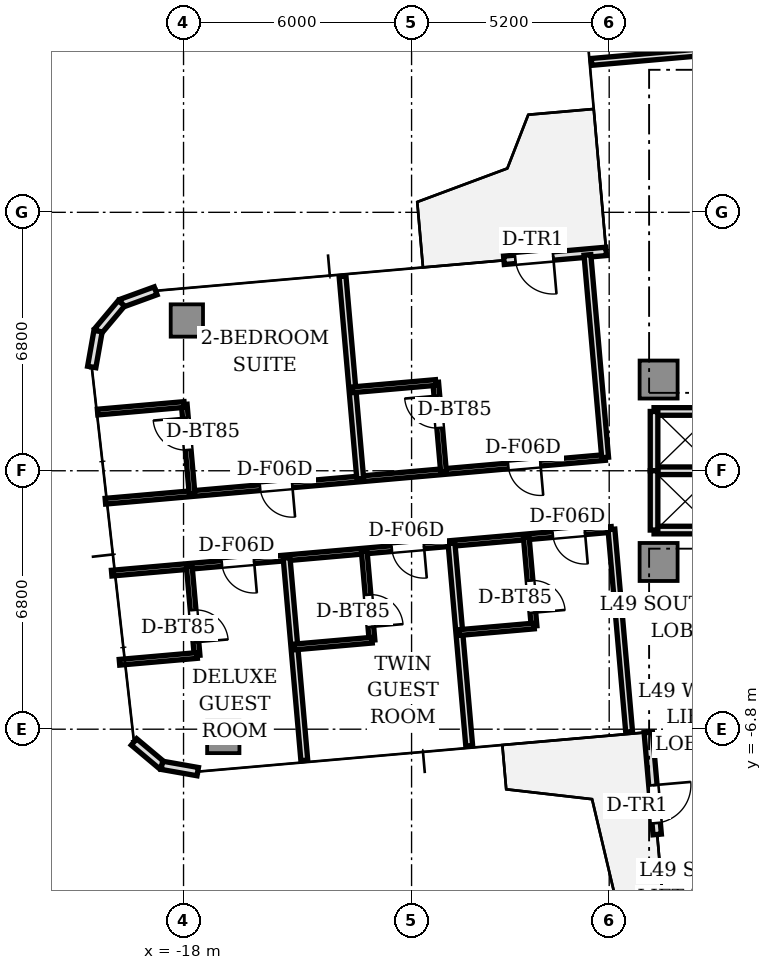
"""IFC4 building model, lengths in metres.
Left out: names, types, materials, properties, quantities, classifications, styles, units other than length and angle.
Written with IfcOpenShell. Run it as: python <this file> out.ifc"""

import sys

from ifc_helpers import new_model, si_unit, direction, frame, frame_2d, origin, origin_2d, place, context, subcontext, project, spatial, rectangle, extrude, source, transform, mapped, element, fill, save


model = new_model("IFC4")
c1 = context("Model", 3, precision=1e-05, world=origin(), true_north=direction((0.0, 1.0)))
c2 = subcontext(c1, "Body", "Model", "MODEL_VIEW")
j1 = project(units=[si_unit("LENGTHUNIT", "METRE"), si_unit("PLANEANGLEUNIT", "RADIAN")], contexts=[c1])
p1 = place(None, origin())
s1 = spatial("IfcSite", under=j1, at=p1, CompositionType="ELEMENT")
p2 = place(p1, origin())
s2 = spatial("IfcBuilding", under=s1, at=p2, CompositionType="ELEMENT")
p3 = place(p2, frame((0.0, 0.0, 178.55)))
s3 = spatial("IfcBuildingStorey", under=s2, at=p3, CompositionType="ELEMENT", Elevation=178.55)
m1 = source(origin(), c2, "Body", "SweptSolid", [
    extrude(rectangle(XDim=1.0, YDim=1.0, at=origin_2d()), origin(), (0.0, 0.0, 1.0), 3.11),
])
for number, where, z_axis, x_axis in (
    (1, (-5.5, 2.4, 0.0), (0.0, 0.0, 1.0), (1.0, 0.0, 0.0)),
    (2, (-5.5, -2.4, 0.0), (0.0, 0.0, 1.0), (1.0, 0.0, 0.0)),
):
    element("IfcColumn", number, at=place(p3, frame(where, z_axis=z_axis, x_axis=x_axis)), inside=s3, PredefinedType="COLUMN", context=c2, shape_type="MappedRepresentation", body=[
        mapped(m1, transform((0.0, 0.0, 0.0), scale=1.0)),
    ])
m2 = source(origin(), c2, "Body", "SweptSolid", [
    extrude(rectangle(XDim=0.85, YDim=0.85, at=origin_2d()), origin(), (0.0, 0.0, 1.0), 3.11),
])
for number, where, z_axis, x_axis in (
    (3, (-17.913, 3.954, 0.0), (0.0, 0.0, 1.0), (1.0, 0.0, 0.0)),
    (4, (-16.954, -7.004, 0.0), (0.0, 0.0, 1.0), (1.0, 0.0, 0.0)),
):
    element("IfcColumn", number, at=place(p3, frame(where, z_axis=z_axis, x_axis=x_axis)), inside=s3, PredefinedType="COLUMN", context=c2, shape_type="MappedRepresentation", body=[
        mapped(m2, transform((0.0, 0.0, 0.0), scale=1.0)),
    ])
p4 = place(p3, frame((-6.879, 5.772, 0.0), z_axis=(0.0, 0.0, 1.0), x_axis=(-0.996193619346, -0.087168071984, 0.0)))
e5 = element("IfcWall", 5, at=p4, inside=s3, PredefinedType="STANDARD", context=c2, shape_type="SweptSolid", body=[
    extrude(rectangle(XDim=2.7, YDim=0.22, at=frame_2d((1.35, 0.0))), origin(), (0.0, 0.0, 1.0), 3.11),
])
p5 = place(p4, frame((1.4, 0.0, 0.0)))
e6 = element("IfcOpeningElement", 6, at=p5, cuts=e5, PredefinedType="OPENING", context=c2, shape_type="SweptSolid", body=[
    extrude(rectangle(XDim=1.0, YDim=2.2, at=frame_2d((0.5, 1.1))), frame((0.0, 0.12, 0.0), z_axis=(0.0, -1.0, 0.0), x_axis=(1.0, 0.0, 0.0)), (0.0, 0.0, 1.0), 0.24),
])
p6 = place(p3, frame((-18.734, 4.735, 0.0), z_axis=(0.0, 0.0, 1.0), x_axis=(-0.939741306239, -0.34188635151, 0.0)))
e7 = element("IfcWall", 7, at=p6, inside=s3, PredefinedType="STANDARD", context=c2, shape_type="SweptSolid", body=[
    extrude(rectangle(XDim=0.958, YDim=0.22, at=frame_2d((0.479, 0.0))), origin(), (0.0, 0.0, 1.0), 3.11),
])
for number, where, z_axis, x_axis in (
    (8, (-19.634, 4.408, 0.0), (0.0, 0.0, 1.0), (-0.643, -0.766, 0.0)),
    (9, (-20.25, 3.674, 0.0), (0.0, 0.0, 1.0), (-0.174, -0.985, 0.0)),
):
    element("IfcWall", number, at=place(p3, frame(where, z_axis=z_axis, x_axis=x_axis)), inside=s3, PredefinedType="STANDARD", context=c2, shape_type="SweptSolid", body=[
        extrude(rectangle(XDim=0.958, YDim=0.22, at=frame_2d((0.479, 0.0))), origin(), (0.0, 0.0, 1.0), 3.11),
    ])
p7 = place(p3, frame((-19.304, -7.135, 0.0), z_axis=(0.0, 0.0, 1.0), x_axis=(0.766001159887, -0.642839189107, 0.0)))
e10 = element("IfcWall", 10, at=p7, inside=s3, PredefinedType="STANDARD", context=c2, shape_type="SweptSolid", body=[
    extrude(rectangle(XDim=0.958, YDim=0.22, at=frame_2d((0.479, 0.0))), origin(), (0.0, 0.0, 1.0), 3.11),
])
p8 = place(p3, frame((-18.57, -7.75, 0.0), z_axis=(0.0, 0.0, 1.0), x_axis=(0.984770724397, -0.173858046606, 0.0)))
e11 = element("IfcWall", 11, at=p8, inside=s3, PredefinedType="STANDARD", context=c2, shape_type="SweptSolid", body=[
    extrude(rectangle(XDim=0.958, YDim=0.22, at=frame_2d((0.479, 0.0))), origin(), (0.0, 0.0, 1.0), 3.11),
])
p9 = place(p3, frame((-5.772, -6.879, 0.0), z_axis=(0.0, 0.0, 1.0), x_axis=(0.087168071984, -0.996193619346, 0.0)))
e12 = element("IfcWall", 12, at=p9, inside=s3, PredefinedType="STANDARD", context=c2, shape_type="SweptSolid", body=[
    extrude(rectangle(XDim=2.7, YDim=0.22, at=frame_2d((1.35, 0.0))), origin(), (0.0, 0.0, 1.0), 3.11),
])
p10 = place(p9, frame((1.4, 0.0, 0.0)))
e13 = element("IfcOpeningElement", 13, at=p10, cuts=e12, PredefinedType="OPENING", context=c2, shape_type="SweptSolid", body=[
    extrude(rectangle(XDim=1.0, YDim=2.2, at=frame_2d((0.5, 1.1))), frame((0.0, 0.12, 0.0), z_axis=(0.0, -1.0, 0.0), x_axis=(1.0, 0.0, 0.0)), (0.0, 0.0, 1.0), 0.24),
])
for number, where, z_axis, x_axis in (
    (14, (-5.62, 1.56, 0.0), (0.0, 0.0, 1.0), (1.0, 0.0, 0.0)),
    (15, (-5.62, -1.56, 0.0), (0.0, 0.0, 1.0), (1.0, 0.0, 0.0)),
    (16, (-5.62, 0.0, 0.0), (0.0, 0.0, 1.0), (1.0, 0.0, 0.0)),
):
    element("IfcWall", number, at=place(p3, frame(where, z_axis=z_axis, x_axis=x_axis)), inside=s3, PredefinedType="SOLIDWALL", context=c2, shape_type="SweptSolid", body=[
        extrude(rectangle(XDim=1.64, YDim=0.2, at=frame_2d((0.82, 0.0))), origin(), (0.0, 0.0, 1.0), 2.66),
    ])
for number, where, z_axis, x_axis in (
    (17, (-5.62, 0.0, 0.0), (0.0, 0.0, 1.0), (0.0, 1.0, 0.0)),
    (18, (-5.62, -1.56, 0.0), (0.0, 0.0, 1.0), (0.0, 1.0, 0.0)),
):
    element("IfcWall", number, at=place(p3, frame(where, z_axis=z_axis, x_axis=x_axis)), inside=s3, PredefinedType="SOLIDWALL", context=c2, shape_type="SweptSolid", body=[
        extrude(rectangle(XDim=1.56, YDim=0.2, at=frame_2d((0.78, 0.0))), origin(), (0.0, 0.0, 1.0), 2.66),
    ])
p11 = place(p3, frame((-1.936, 11.224, 0.0), z_axis=(0.0, 0.0, 1.0), x_axis=(-0.996194212812, -0.087161289348, 0.0)))
e19 = element("IfcWall", 19, at=p11, inside=s3, PredefinedType="PARTITIONING", context=c2, shape_type="SweptSolid", body=[
    extrude(rectangle(XDim=5.35, YDim=0.18, at=frame_2d((2.675, 0.0))), origin(), (0.0, 0.0, 1.0), 2.66),
])
p12 = place(p3, frame((-6.741, -1.543, 0.0), z_axis=(0.0, 0.0, 1.0), x_axis=(-0.996195062465, -0.087151577845, 0.0)))
e20 = element("IfcWall", 20, at=p12, inside=s3, PredefinedType="PARTITIONING", context=c2, shape_type="SweptSolid", body=[
    extrude(rectangle(XDim=13.2, YDim=0.15, at=frame_2d((6.6, 0.0))), origin(), (0.0, 0.0, 1.0), 2.66),
])
p13 = place(p12, frame((0.7, 0.0, 0.0)))
e21 = element("IfcOpeningElement", 21, at=p13, cuts=e20, PredefinedType="OPENING", context=c2, shape_type="SweptSolid", body=[
    extrude(rectangle(XDim=0.85, YDim=2.1, at=frame_2d((0.425, 1.05))), frame((0.0, 0.085, 0.0), z_axis=(0.0, -1.0, 0.0), x_axis=(1.0, 0.0, 0.0)), (0.0, 0.0, 1.0), 0.17),
])
p14 = place(p12, frame((4.952, 0.0, 0.0)))
e22 = element("IfcOpeningElement", 22, at=p14, cuts=e20, PredefinedType="OPENING", context=c2, shape_type="SweptSolid", body=[
    extrude(rectangle(XDim=0.85, YDim=2.1, at=frame_2d((0.425, 1.05))), frame((0.0, 0.085, 0.0), z_axis=(0.0, -1.0, 0.0), x_axis=(1.0, 0.0, 0.0)), (0.0, 0.0, 1.0), 0.17),
])
p15 = place(p12, frame((9.44, 0.0, 0.0)))
e23 = element("IfcOpeningElement", 23, at=p15, cuts=e20, PredefinedType="OPENING", context=c2, shape_type="SweptSolid", body=[
    extrude(rectangle(XDim=0.85, YDim=2.1, at=frame_2d((0.425, 1.05))), frame((0.0, 0.085, 0.0), z_axis=(0.0, -1.0, 0.0), x_axis=(1.0, 0.0, 0.0)), (0.0, 0.0, 1.0), 0.17),
])
p16 = place(p3, frame((-6.907, 0.349, 0.0), z_axis=(0.0, 0.0, 1.0), x_axis=(-0.996195062465, -0.087151577845, 0.0)))
e24 = element("IfcWall", 24, at=p16, inside=s3, PredefinedType="PARTITIONING", context=c2, shape_type="SweptSolid", body=[
    extrude(rectangle(XDim=13.2, YDim=0.15, at=frame_2d((6.6, 0.0))), origin(), (0.0, 0.0, 1.0), 2.66),
])
p17 = place(p16, frame((1.71, 0.0, 0.0)))
e25 = element("IfcOpeningElement", 25, at=p17, cuts=e24, PredefinedType="OPENING", context=c2, shape_type="SweptSolid", body=[
    extrude(rectangle(XDim=0.85, YDim=2.1, at=frame_2d((0.425, 1.05))), frame((0.0, 0.085, 0.0), z_axis=(0.0, -1.0, 0.0), x_axis=(1.0, 0.0, 0.0)), (0.0, 0.0, 1.0), 0.17),
])
p18 = place(p16, frame((8.264, 0.0, 0.0)))
e26 = element("IfcOpeningElement", 26, at=p18, cuts=e24, PredefinedType="OPENING", context=c2, shape_type="SweptSolid", body=[
    extrude(rectangle(XDim=0.85, YDim=2.1, at=frame_2d((0.425, 1.05))), frame((0.0, 0.085, 0.0), z_axis=(0.0, -1.0, 0.0), x_axis=(1.0, 0.0, 0.0)), (0.0, 0.0, 1.0), 0.17),
])
for number, where, z_axis, x_axis in (
    (27, (-6.741, -1.543, 0.0), (0.0, 0.0, 1.0), (0.087, -0.996, 0.0)),
    (28, (-7.373, 5.679, 0.0), (0.0, 0.0, 1.0), (0.087, -0.996, 0.0)),
    (29, (-10.949, -1.912, 0.0), (0.0, 0.0, 1.0), (0.087, -0.996, 0.0)),
):
    element("IfcWall", number, at=place(p3, frame(where, z_axis=z_axis, x_axis=x_axis)), inside=s3, PredefinedType="PARTITIONING", context=c2, shape_type="SweptSolid", body=[
        extrude(rectangle(XDim=5.35, YDim=0.18, at=frame_2d((2.675, 0.0))), origin(), (0.0, 0.0, 1.0), 2.66),
    ])
p19 = place(p3, frame((-8.983, -1.74, 0.0), z_axis=(0.0, 0.0, 1.0), x_axis=(0.087224846905, -0.996188649846, 0.0)))
e30 = element("IfcWall", 30, at=p19, inside=s3, PredefinedType="PARTITIONING", context=c2, shape_type="SweptSolid", body=[
    extrude(rectangle(XDim=2.354, YDim=0.15, at=frame_2d((1.177, 0.0))), origin(), (0.0, 0.0, 1.0), 2.66),
])
p20 = place(p19, frame((1.154, 0.0, 0.0)))
e31 = element("IfcOpeningElement", 31, at=p20, cuts=e30, PredefinedType="OPENING", context=c2, shape_type="SweptSolid", body=[
    extrude(rectangle(XDim=0.85, YDim=2.1, at=frame_2d((0.425, 1.05))), frame((0.0, 0.085, 0.0), z_axis=(0.0, -1.0, 0.0), x_axis=(1.0, 0.0, 0.0)), (0.0, 0.0, 1.0), 0.17),
])
p21 = place(p3, frame((-8.777, -4.084, 0.0), z_axis=(0.0, 0.0, 1.0), x_axis=(-0.996191703625, -0.087189962887, 0.0)))
e32 = element("IfcWall", 32, at=p21, inside=s3, PredefinedType="PARTITIONING", context=c2, shape_type="SweptSolid", body=[
    extrude(rectangle(XDim=1.974, YDim=0.15, at=frame_2d((0.987, 0.0))), origin(), (0.0, 0.0, 1.0), 2.66),
])
p22 = place(p3, frame((-15.289, -2.291, 0.0), z_axis=(0.0, 0.0, 1.0), x_axis=(0.087161289348, -0.996194212812, 0.0)))
e33 = element("IfcWall", 33, at=p22, inside=s3, PredefinedType="PARTITIONING", context=c2, shape_type="SweptSolid", body=[
    extrude(rectangle(XDim=5.35, YDim=0.18, at=frame_2d((2.675, 0.0))), origin(), (0.0, 0.0, 1.0), 2.66),
])
p23 = place(p3, frame((-13.246, -2.113, 0.0), z_axis=(0.0, 0.0, 1.0), x_axis=(0.087224846905, -0.996188649846, 0.0)))
e34 = element("IfcWall", 34, at=p23, inside=s3, PredefinedType="PARTITIONING", context=c2, shape_type="SweptSolid", body=[
    extrude(rectangle(XDim=2.354, YDim=0.15, at=frame_2d((1.177, 0.0))), origin(), (0.0, 0.0, 1.0), 2.66),
])
p24 = place(p23, frame((1.154, 0.0, 0.0)))
e35 = element("IfcOpeningElement", 35, at=p24, cuts=e34, PredefinedType="OPENING", context=c2, shape_type="SweptSolid", body=[
    extrude(rectangle(XDim=0.85, YDim=2.1, at=frame_2d((0.425, 1.05))), frame((0.0, 0.085, 0.0), z_axis=(0.0, -1.0, 0.0), x_axis=(1.0, 0.0, 0.0)), (0.0, 0.0, 1.0), 0.17),
])
p25 = place(p3, frame((-13.041, -4.458, 0.0), z_axis=(0.0, 0.0, 1.0), x_axis=(-0.99619307114, -0.087174336889, 0.0)))
e36 = element("IfcWall", 36, at=p25, inside=s3, PredefinedType="PARTITIONING", context=c2, shape_type="SweptSolid", body=[
    extrude(rectangle(XDim=2.05, YDim=0.15, at=frame_2d((1.025, 0.0))), origin(), (0.0, 0.0, 1.0), 2.66),
])
p26 = place(p3, frame((-17.849, -2.515, 0.0), z_axis=(0.0, 0.0, 1.0), x_axis=(0.087121918963, -0.996197656711, 0.0)))
e37 = element("IfcWall", 37, at=p26, inside=s3, PredefinedType="PARTITIONING", context=c2, shape_type="SweptSolid", body=[
    extrude(rectangle(XDim=2.354, YDim=0.15, at=frame_2d((1.177, 0.0))), origin(), (0.0, 0.0, 1.0), 2.66),
])
p27 = place(p26, frame((1.154, 0.0, 0.0)))
e38 = element("IfcOpeningElement", 38, at=p27, cuts=e37, PredefinedType="OPENING", context=c2, shape_type="SweptSolid", body=[
    extrude(rectangle(XDim=0.85, YDim=2.1, at=frame_2d((0.425, 1.05))), frame((0.0, 0.085, 0.0), z_axis=(0.0, -1.0, 0.0), x_axis=(1.0, 0.0, 0.0)), (0.0, 0.0, 1.0), 0.17),
])
p28 = place(p3, frame((-17.644, -4.86, 0.0), z_axis=(0.0, 0.0, 1.0), x_axis=(-0.99619307114, -0.087174336889, 0.0)))
e39 = element("IfcWall", 39, at=p28, inside=s3, PredefinedType="PARTITIONING", context=c2, shape_type="SweptSolid", body=[
    extrude(rectangle(XDim=2.05, YDim=0.15, at=frame_2d((1.025, 0.0))), origin(), (0.0, 0.0, 1.0), 2.66),
])
p29 = place(p3, frame((-13.35, -0.214, 0.0), z_axis=(0.0, 0.0, 1.0), x_axis=(-0.087161289348, 0.996194212812, 0.0)))
e40 = element("IfcWall", 40, at=p29, inside=s3, PredefinedType="PARTITIONING", context=c2, shape_type="SweptSolid", body=[
    extrude(rectangle(XDim=5.35, YDim=0.18, at=frame_2d((2.675, 0.0))), origin(), (0.0, 0.0, 1.0), 2.66),
])
p30 = place(p3, frame((-11.159, -0.023, 0.0), z_axis=(0.0, 0.0, 1.0), x_axis=(-0.087224846905, 0.996188649846, 0.0)))
e41 = element("IfcWall", 41, at=p30, inside=s3, PredefinedType="PARTITIONING", context=c2, shape_type="SweptSolid", body=[
    extrude(rectangle(XDim=2.354, YDim=0.15, at=frame_2d((1.177, 0.0))), origin(), (0.0, 0.0, 1.0), 2.66),
])
p31 = place(p30, frame((1.154, 0.0, 0.0)))
e42 = element("IfcOpeningElement", 42, at=p31, cuts=e41, PredefinedType="OPENING", context=c2, shape_type="SweptSolid", body=[
    extrude(rectangle(XDim=0.85, YDim=2.1, at=frame_2d((0.425, 1.05))), frame((0.0, 0.085, 0.0), z_axis=(0.0, -1.0, 0.0), x_axis=(1.0, 0.0, 0.0)), (0.0, 0.0, 1.0), 0.17),
])
p32 = place(p3, frame((-11.365, 2.322, 0.0), z_axis=(0.0, 0.0, 1.0), x_axis=(-0.996195042958, -0.087151800816, 0.0)))
e43 = element("IfcWall", 43, at=p32, inside=s3, PredefinedType="PARTITIONING", context=c2, shape_type="SweptSolid", body=[
    extrude(rectangle(XDim=2.199, YDim=0.15, at=frame_2d((1.1, 0.0))), origin(), (0.0, 0.0, 1.0), 2.66),
])
p33 = place(p3, frame((-17.776, -0.602, 0.0), z_axis=(0.0, 0.0, 1.0), x_axis=(-0.087224846905, 0.996188649846, 0.0)))
e44 = element("IfcWall", 44, at=p33, inside=s3, PredefinedType="PARTITIONING", context=c2, shape_type="SweptSolid", body=[
    extrude(rectangle(XDim=2.354, YDim=0.15, at=frame_2d((1.177, 0.0))), origin(), (0.0, 0.0, 1.0), 2.63),
])
p34 = place(p33, frame((1.154, 0.0, 0.0)))
e45 = element("IfcOpeningElement", 45, at=p34, cuts=e44, PredefinedType="OPENING", context=c2, shape_type="SweptSolid", body=[
    extrude(rectangle(XDim=0.85, YDim=2.1, at=frame_2d((0.425, 1.05))), frame((0.0, 0.085, 0.0), z_axis=(0.0, -1.0, 0.0), x_axis=(1.0, 0.0, 0.0)), (0.0, 0.0, 1.0), 0.17),
])
p35 = place(p3, frame((-17.981, 1.743, 0.0), z_axis=(0.0, 0.0, 1.0), x_axis=(-0.996196032585, -0.087140488075, 0.0)))
e46 = element("IfcWall", 46, at=p35, inside=s3, PredefinedType="PARTITIONING", context=c2, shape_type="SweptSolid", body=[
    extrude(rectangle(XDim=2.289, YDim=0.15, at=frame_2d((1.145, 0.0))), origin(), (0.0, 0.0, 1.0), 2.66),
])
p36 = place(p3, frame((-5.287, -11.856, 0.0), z_axis=(0.0, 0.0, 1.0), x_axis=(0.996194790044, 0.087154691724, 0.0)))
e47 = element("IfcWall", 47, at=p36, inside=s3, PredefinedType="PARTITIONING", context=c2, shape_type="SweptSolid", body=[
    extrude(rectangle(XDim=12.6, YDim=0.15, at=frame_2d((6.3, 0.0))), origin(), (0.0, 0.0, 1.0), 2.66),
])
p37 = place(p36, frame((5.5, 0.0, 0.0)))
e48 = element("IfcOpeningElement", 48, at=p37, cuts=e47, PredefinedType="OPENING", context=c2, shape_type="SweptSolid", body=[
    extrude(rectangle(XDim=1.6, YDim=2.25, at=frame_2d((0.8, 1.125))), frame((0.0, 0.085, 0.0), z_axis=(0.0, -1.0, 0.0), x_axis=(1.0, 0.0, 0.0)), (0.0, 0.0, 1.0), 0.17),
])
m3 = source(origin(), c2, "Body", "SweptSolid", [
    extrude(rectangle(XDim=1.0, YDim=0.05, at=origin_2d()), origin(), (0.0, 0.0, 1.0), 2.2),
])
p38 = place(p5, frame((0.5, 0.0, 0.0)))
e49 = element("IfcDoor", 49, at=p38, inside=s3, OperationType="SINGLE_SWING_LEFT", PredefinedType="DOOR", context=c2, shape_type="MappedRepresentation", body=[
    mapped(m3, transform((0.0, 0.0, 0.0), scale=1.0)),
])
fill(e6, e49)
p39 = place(p10, frame((0.5, 0.0, 0.0)))
e50 = element("IfcDoor", 50, at=p39, inside=s3, OperationType="SINGLE_SWING_LEFT", PredefinedType="DOOR", context=c2, shape_type="MappedRepresentation", body=[
    mapped(m3, transform((0.0, 0.0, 0.0), scale=1.0)),
])
fill(e13, e50)
m4 = source(origin(), c2, "Body", "SweptSolid", [
    extrude(rectangle(XDim=0.85, YDim=0.05, at=origin_2d()), origin(), (0.0, 0.0, 1.0), 2.1),
])
p40 = place(p20, frame((0.425, 0.0, 0.0)))
e51 = element("IfcDoor", 51, at=p40, inside=s3, OperationType="SINGLE_SWING_RIGHT", PredefinedType="DOOR", context=c2, shape_type="MappedRepresentation", body=[
    mapped(m4, transform((0.0, 0.0, 0.0), scale=1.0)),
])
fill(e31, e51)
p41 = place(p13, frame((0.425, 0.0, 0.0)))
e52 = element("IfcDoor", 52, at=p41, inside=s3, OperationType="SINGLE_SWING_LEFT", PredefinedType="DOOR", context=c2, shape_type="MappedRepresentation", body=[
    mapped(m4, transform((0.0, 0.0, 0.0), scale=1.0)),
])
fill(e21, e52)
p42 = place(p24, frame((0.425, 0.0, 0.0)))
e53 = element("IfcDoor", 53, at=p42, inside=s3, OperationType="SINGLE_SWING_RIGHT", PredefinedType="DOOR", context=c2, shape_type="MappedRepresentation", body=[
    mapped(m4, transform((0.0, 0.0, 0.0), scale=1.0)),
])
fill(e35, e53)
p43 = place(p14, frame((0.425, 0.0, 0.0)))
e54 = element("IfcDoor", 54, at=p43, inside=s3, OperationType="SINGLE_SWING_LEFT", PredefinedType="DOOR", context=c2, shape_type="MappedRepresentation", body=[
    mapped(m4, transform((0.0, 0.0, 0.0), scale=1.0)),
])
fill(e22, e54)
p44 = place(p27, frame((0.425, 0.0, 0.0)))
e55 = element("IfcDoor", 55, at=p44, inside=s3, OperationType="SINGLE_SWING_RIGHT", PredefinedType="DOOR", context=c2, shape_type="MappedRepresentation", body=[
    mapped(m4, transform((0.0, 0.0, 0.0), scale=1.0)),
])
fill(e38, e55)
p45 = place(p15, frame((0.425, 0.0, 0.0)))
e56 = element("IfcDoor", 56, at=p45, inside=s3, OperationType="SINGLE_SWING_LEFT", PredefinedType="DOOR", context=c2, shape_type="MappedRepresentation", body=[
    mapped(m4, transform((0.0, 0.0, 0.0), scale=1.0)),
])
fill(e23, e56)
p46 = place(p31, frame((0.425, 0.0, 0.0)))
e57 = element("IfcDoor", 57, at=p46, inside=s3, OperationType="SINGLE_SWING_RIGHT", PredefinedType="DOOR", context=c2, shape_type="MappedRepresentation", body=[
    mapped(m4, transform((0.0, 0.0, 0.0), scale=1.0)),
])
fill(e42, e57)
p47 = place(p17, frame((0.425, 0.0, 0.0)))
e58 = element("IfcDoor", 58, at=p47, inside=s3, OperationType="SINGLE_SWING_LEFT", PredefinedType="DOOR", context=c2, shape_type="MappedRepresentation", body=[
    mapped(m4, transform((0.0, 0.0, 0.0), scale=1.0)),
])
fill(e25, e58)
p48 = place(p34, frame((0.425, 0.0, 0.0)))
e59 = element("IfcDoor", 59, at=p48, inside=s3, OperationType="SINGLE_SWING_RIGHT", PredefinedType="DOOR", context=c2, shape_type="MappedRepresentation", body=[
    mapped(m4, transform((0.0, 0.0, 0.0), scale=1.0)),
])
fill(e45, e59)
p49 = place(p18, frame((0.425, 0.0, 0.0)))
e60 = element("IfcDoor", 60, at=p49, inside=s3, OperationType="SINGLE_SWING_LEFT", PredefinedType="DOOR", context=c2, shape_type="MappedRepresentation", body=[
    mapped(m4, transform((0.0, 0.0, 0.0), scale=1.0)),
])
fill(e26, e60)
save(model, sys.argv[1])
